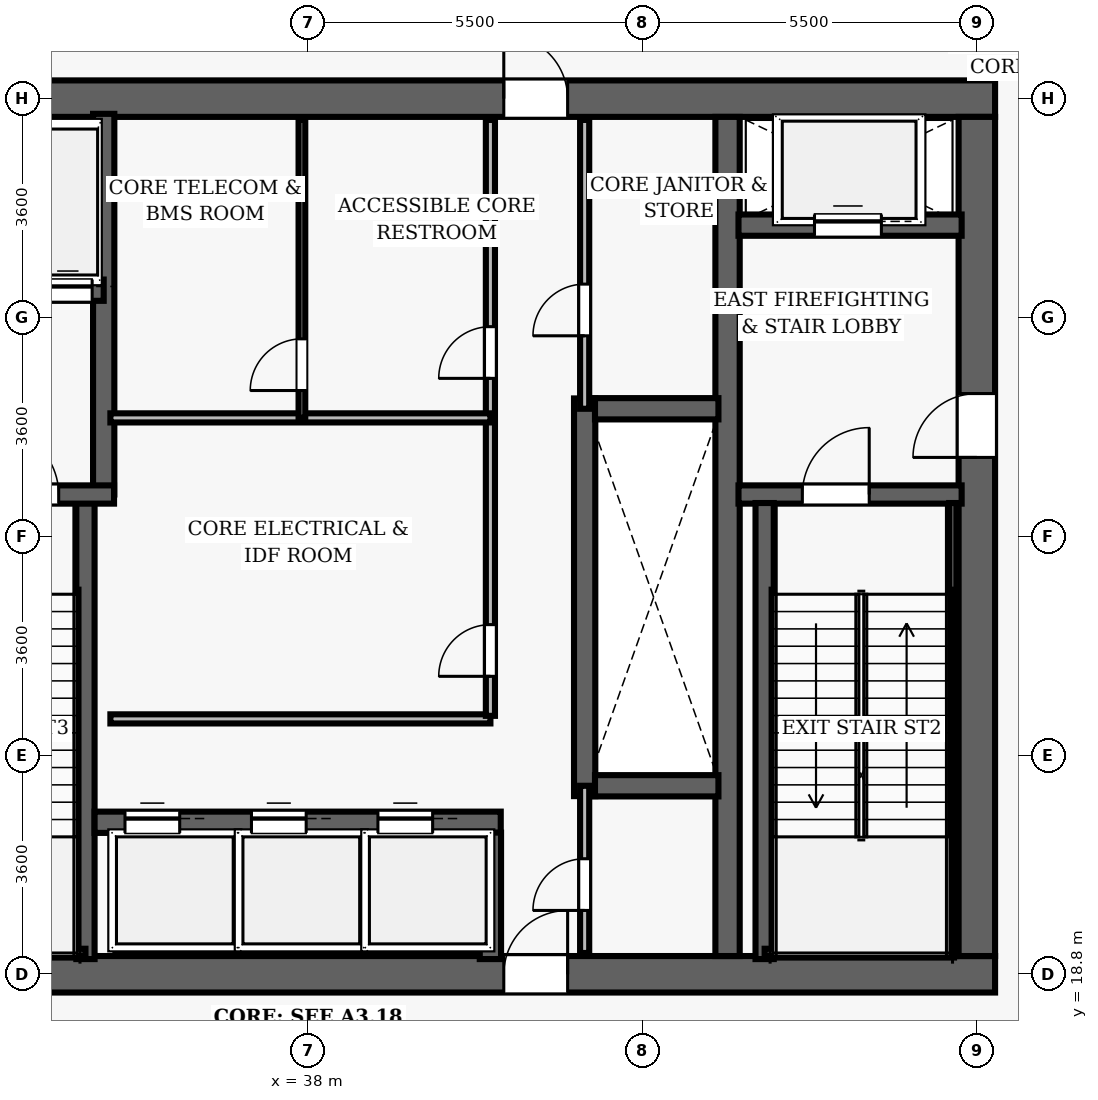
"""IFC4 building model, lengths in metres.
Left out: names, types, materials, properties, quantities, classifications, styles, units other than length and angle.
Written with IfcOpenShell. Run it as: python <this file> out.ifc"""

import sys

from ifc_helpers import new_model, si_unit, direction, frame, frame_2d, origin, place, context, subcontext, project, spatial, rectangle, extrude, element, fill, save


model = new_model("IFC4")
c1 = context("Model", 3, precision=1e-05, world=origin(), true_north=direction((0.0, 1.0)))
c2 = subcontext(c1, "Body", "Model", "MODEL_VIEW")
j1 = project(units=[si_unit("LENGTHUNIT", "METRE"), si_unit("PLANEANGLEUNIT", "RADIAN")], contexts=[c1])
p1 = place(None, origin())
s1 = spatial("IfcSite", under=j1, at=p1, CompositionType="ELEMENT")
p2 = place(p1, origin())
s2 = spatial("IfcBuilding", under=s1, at=p2, CompositionType="ELEMENT")
p3 = place(p2, frame((0.0, 0.0, 165.8)))
s3 = spatial("IfcBuildingStorey", under=s2, at=p3, CompositionType="ELEMENT", Elevation=165.8)
p4 = place(p3, frame((26.7, 18.8, 0.0), z_axis=(0.0, 0.0, 1.0), x_axis=(1.0, 0.0, 0.0)))
e1 = element("IfcWall", 1, at=p4, inside=s3, PredefinedType="SHEAR", context=c2, shape_type="SweptSolid", body=[
    extrude(rectangle(XDim=22.6, YDim=0.6, at=frame_2d((11.3, 0.0))), origin(), (0.0, 0.0, 1.0), 5.4),
])
p5 = place(p4, frame((14.52, 0.0, 0.0)))
e2 = element("IfcOpeningElement", 2, at=p5, cuts=e1, PredefinedType="OPENING", context=c2, shape_type="SweptSolid", body=[
    extrude(rectangle(XDim=1.05, YDim=2.15, at=frame_2d((0.525, 1.075))), frame((0.0, 0.31, 0.0), z_axis=(0.0, -1.0, 0.0), x_axis=(1.0, 0.0, 0.0)), (0.0, 0.0, 1.0), 0.62),
])
p6 = place(p3, frame((26.7, 33.2, 0.0), z_axis=(0.0, 0.0, 1.0), x_axis=(1.0, 0.0, 0.0)))
e3 = element("IfcWall", 3, at=p6, inside=s3, PredefinedType="SHEAR", context=c2, shape_type="SweptSolid", body=[
    extrude(rectangle(XDim=22.6, YDim=0.6, at=frame_2d((11.3, 0.0))), origin(), (0.0, 0.0, 1.0), 5.4),
])
p7 = place(p6, frame((4.62, 0.0, 0.0)))
e4 = element("IfcOpeningElement", 4, at=p7, cuts=e3, PredefinedType="OPENING", context=c2, shape_type="SweptSolid", body=[
    extrude(rectangle(XDim=1.05, YDim=2.15, at=frame_2d((0.525, 1.075))), frame((0.0, 0.31, 0.0), z_axis=(0.0, -1.0, 0.0), x_axis=(1.0, 0.0, 0.0)), (0.0, 0.0, 1.0), 0.62),
])
p8 = place(p6, frame((14.52, 0.0, 0.0)))
e5 = element("IfcOpeningElement", 5, at=p8, cuts=e3, PredefinedType="OPENING", context=c2, shape_type="SweptSolid", body=[
    extrude(rectangle(XDim=1.05, YDim=2.15, at=frame_2d((0.525, 1.075))), frame((0.0, 0.31, 0.0), z_axis=(0.0, -1.0, 0.0), x_axis=(1.0, 0.0, 0.0)), (0.0, 0.0, 1.0), 0.62),
])
p9 = place(p3, frame((49.0, 19.1, 0.0), z_axis=(0.0, 0.0, 1.0), x_axis=(0.0, 1.0, 0.0)))
e6 = element("IfcWall", 6, at=p9, inside=s3, PredefinedType="SHEAR", context=c2, shape_type="SweptSolid", body=[
    extrude(rectangle(XDim=13.8, YDim=0.6, at=frame_2d((6.9, 0.0))), origin(), (0.0, 0.0, 1.0), 5.4),
])
p10 = place(p9, frame((8.2, 0.0, 0.0)))
e7 = element("IfcOpeningElement", 7, at=p10, cuts=e6, PredefinedType="OPENING", context=c2, shape_type="SweptSolid", body=[
    extrude(rectangle(XDim=1.05, YDim=2.15, at=frame_2d((0.525, 1.075))), frame((0.0, 0.31, 0.0), z_axis=(0.0, -1.0, 0.0), x_axis=(1.0, 0.0, 0.0)), (0.0, 0.0, 1.0), 0.62),
])
p11 = place(p3, frame((44.9, 19.1, 0.0), z_axis=(0.0, 0.0, 1.0), x_axis=(0.0, 1.0, 0.0)))
e8 = element("IfcWall", 8, at=p11, inside=s3, PredefinedType="SHEAR", context=c2, shape_type="SweptSolid", body=[
    extrude(rectangle(XDim=13.8, YDim=0.4, at=frame_2d((6.9, 0.0))), origin(), (0.0, 0.0, 1.0), 5.4),
])
p12 = place(p3, frame((45.08, 26.69, 0.0), z_axis=(0.0, 0.0, 1.0), x_axis=(1.0, 0.0, 0.0)))
e9 = element("IfcWall", 9, at=p12, inside=s3, PredefinedType="SHEAR", context=c2, shape_type="SweptSolid", body=[
    extrude(rectangle(XDim=3.67, YDim=0.3, at=frame_2d((1.835, 0.0))), origin(), (0.0, 0.0, 1.0), 5.4),
])
p13 = place(p12, frame((1.05, 0.0, 0.0)))
e10 = element("IfcOpeningElement", 10, at=p13, cuts=e9, PredefinedType="OPENING", context=c2, shape_type="SweptSolid", body=[
    extrude(rectangle(XDim=1.1, YDim=2.15, at=frame_2d((0.55, 1.075))), frame((0.0, 0.16, 0.0), z_axis=(0.0, -1.0, 0.0), x_axis=(1.0, 0.0, 0.0)), (0.0, 0.0, 1.0), 0.32),
])
p14 = place(p3, frame((45.51, 19.05, 0.0), z_axis=(0.0, 0.0, 1.0), x_axis=(0.0, 1.0, 0.0)))
e11 = element("IfcWall", 11, at=p14, inside=s3, PredefinedType="SHEAR", context=c2, shape_type="SweptSolid", body=[
    extrude(rectangle(XDim=7.5, YDim=0.3, at=frame_2d((3.75, 0.0))), origin(), (0.0, 0.0, 1.0), 5.4),
])
p15 = place(p3, frame((48.605, 19.1, 0.0), z_axis=(0.0, 0.0, 1.0), x_axis=(0.0, 1.0, 0.0)))
e12 = element("IfcWall", 12, at=p15, inside=s3, PredefinedType="SHEAR", context=c2, shape_type="SweptSolid", body=[
    extrude(rectangle(XDim=7.45, YDim=0.12, at=frame_2d((3.725, 0.0))), origin(), (0.0, 0.0, 1.0), 5.4),
])
p16 = place(p3, frame((45.51, 19.16, 0.0), z_axis=(0.0, 0.0, 1.0), x_axis=(1.0, 0.0, 0.0)))
e13 = element("IfcWall", 13, at=p16, inside=s3, PredefinedType="SHEAR", context=c2, shape_type="SweptSolid", body=[
    extrude(rectangle(XDim=3.095, YDim=0.12, at=frame_2d((1.547, 0.0))), origin(), (0.0, 0.0, 1.0), 5.4),
])
p17 = place(p3, frame((45.08, 31.12, 0.0), z_axis=(0.0, 0.0, 1.0), x_axis=(1.0, 0.0, 0.0)))
e14 = element("IfcWall", 14, at=p17, inside=s3, PredefinedType="SHEAR", context=c2, shape_type="SweptSolid", body=[
    extrude(rectangle(XDim=3.67, YDim=0.35, at=frame_2d((1.835, 0.0))), origin(), (0.0, 0.0, 1.0), 4.04),
])
p18 = place(p17, frame((1.25, 0.0, 0.0)))
e15 = element("IfcOpeningElement", 15, at=p18, cuts=e14, PredefinedType="OPENING", context=c2, shape_type="SweptSolid", body=[
    extrude(rectangle(XDim=1.1, YDim=2.15, at=frame_2d((0.55, 1.075))), frame((0.0, 0.185, 0.0), z_axis=(0.0, -1.0, 0.0), x_axis=(1.0, 0.0, 0.0)), (0.0, 0.0, 1.0), 0.37),
])
p19 = place(p3, frame((34.34, 19.05, 0.0), z_axis=(0.0, 0.0, 1.0), x_axis=(0.0, 1.0, 0.0)))
e16 = element("IfcWall", 16, at=p19, inside=s3, PredefinedType="SHEAR", context=c2, shape_type="SweptSolid", body=[
    extrude(rectangle(XDim=7.5, YDim=0.3, at=frame_2d((3.75, 0.0))), origin(), (0.0, 0.0, 1.0), 5.4),
])
p20 = place(p3, frame((34.64, 26.69, 0.0), z_axis=(0.0, 0.0, 1.0), x_axis=(0.0, 1.0, 0.0)))
e17 = element("IfcWall", 17, at=p20, inside=s3, PredefinedType="SHEAR", context=c2, shape_type="SweptSolid", body=[
    extrude(rectangle(XDim=6.26, YDim=0.35, at=frame_2d((3.13, 0.0))), origin(), (0.0, 0.0, 1.0), 5.4),
])
p21 = place(p3, frame((31.25, 26.69, 0.0), z_axis=(0.0, 0.0, 1.0), x_axis=(1.0, 0.0, 0.0)))
e18 = element("IfcWall", 18, at=p21, inside=s3, PredefinedType="SHEAR", context=c2, shape_type="SweptSolid", body=[
    extrude(rectangle(XDim=3.56, YDim=0.3, at=frame_2d((1.78, 0.0))), origin(), (0.0, 0.0, 1.0), 5.4),
])
p22 = place(p21, frame((1.55, 0.0, 0.0)))
e19 = element("IfcOpeningElement", 19, at=p22, cuts=e18, PredefinedType="OPENING", context=c2, shape_type="SweptSolid", body=[
    extrude(rectangle(XDim=1.1, YDim=2.15, at=frame_2d((0.55, 1.075))), frame((0.0, 0.16, 0.0), z_axis=(0.0, -1.0, 0.0), x_axis=(1.0, 0.0, 0.0)), (0.0, 0.0, 1.0), 0.32),
])
p23 = place(p3, frame((31.3, 19.16, 0.0), z_axis=(0.0, 0.0, 1.0), x_axis=(1.0, 0.0, 0.0)))
e20 = element("IfcWall", 20, at=p23, inside=s3, PredefinedType="SHEAR", context=c2, shape_type="SweptSolid", body=[
    extrude(rectangle(XDim=3.04, YDim=0.12, at=frame_2d((1.52, 0.0))), origin(), (0.0, 0.0, 1.0), 5.4),
])
p24 = place(p3, frame((32.23, 30.05, 0.0), z_axis=(0.0, 0.0, 1.0), x_axis=(1.0, 0.0, 0.0)))
e21 = element("IfcWall", 21, at=p24, inside=s3, PredefinedType="SHEAR", context=c2, shape_type="SweptSolid", body=[
    extrude(rectangle(XDim=2.41, YDim=0.35, at=frame_2d((1.205, 0.0))), origin(), (0.0, 0.0, 1.0), 4.04),
])
p25 = place(p24, frame((0.42, 0.0, 0.0)))
e22 = element("IfcOpeningElement", 22, at=p25, cuts=e21, PredefinedType="OPENING", context=c2, shape_type="SweptSolid", body=[
    extrude(rectangle(XDim=0.8, YDim=2.15, at=frame_2d((0.4, 1.075))), frame((0.0, 0.185, 0.0), z_axis=(0.0, -1.0, 0.0), x_axis=(1.0, 0.0, 0.0)), (0.0, 0.0, 1.0), 0.37),
])
p26 = place(p24, frame((1.42, 0.0, 0.0)))
e23 = element("IfcOpeningElement", 23, at=p26, cuts=e21, PredefinedType="OPENING", context=c2, shape_type="SweptSolid", body=[
    extrude(rectangle(XDim=0.8, YDim=2.15, at=frame_2d((0.4, 1.075))), frame((0.0, 0.185, 0.0), z_axis=(0.0, -1.0, 0.0), x_axis=(1.0, 0.0, 0.0)), (0.0, 0.0, 1.0), 0.37),
])
p27 = place(p3, frame((42.55, 21.73, 0.0), z_axis=(0.0, 0.0, 1.0), x_axis=(0.0, 1.0, 0.0)))
e24 = element("IfcWall", 24, at=p27, inside=s3, PredefinedType="SHEAR", context=c2, shape_type="SweptSolid", body=[
    extrude(rectangle(XDim=6.54, YDim=0.35, at=frame_2d((3.27, 0.0))), origin(), (0.0, 0.0, 1.0), 4.04),
])
for number, where, z_axis, x_axis in (
    (25, (42.72, 21.9, 0.0), (0.0, 0.0, 1.0), (1.0, 0.0, 0.0)),
    (26, (42.72, 28.1, 0.0), (0.0, 0.0, 1.0), (1.0, 0.0, 0.0)),
):
    element("IfcWall", number, at=place(p3, frame(where, z_axis=z_axis, x_axis=x_axis)), inside=s3, PredefinedType="SHEAR", context=c2, shape_type="SweptSolid", body=[
        extrude(rectangle(XDim=2.03, YDim=0.35, at=frame_2d((1.015, 0.0))), origin(), (0.0, 0.0, 1.0), 4.04),
    ])
p28 = place(p3, frame((34.49, 21.3, 0.0), z_axis=(0.0, 0.0, 1.0), x_axis=(1.0, 0.0, 0.0)))
e27 = element("IfcWall", 27, at=p28, inside=s3, PredefinedType="SHEAR", context=c2, shape_type="SweptSolid", body=[
    extrude(rectangle(XDim=6.68, YDim=0.35, at=frame_2d((3.34, 0.0))), origin(), (0.0, 0.0, 1.0), 4.04),
])
p29 = place(p28, frame((0.5, 0.0, 0.0)))
e28 = element("IfcOpeningElement", 28, at=p29, cuts=e27, PredefinedType="OPENING", context=c2, shape_type="SweptSolid", body=[
    extrude(rectangle(XDim=0.9, YDim=2.15, at=frame_2d((0.45, 1.075))), frame((0.0, 0.185, 0.0), z_axis=(0.0, -1.0, 0.0), x_axis=(1.0, 0.0, 0.0)), (0.0, 0.0, 1.0), 0.37),
])
p30 = place(p28, frame((2.58, 0.0, 0.0)))
e29 = element("IfcOpeningElement", 29, at=p30, cuts=e27, PredefinedType="OPENING", context=c2, shape_type="SweptSolid", body=[
    extrude(rectangle(XDim=0.9, YDim=2.15, at=frame_2d((0.45, 1.075))), frame((0.0, 0.185, 0.0), z_axis=(0.0, -1.0, 0.0), x_axis=(1.0, 0.0, 0.0)), (0.0, 0.0, 1.0), 0.37),
])
p31 = place(p28, frame((4.66, 0.0, 0.0)))
e30 = element("IfcOpeningElement", 30, at=p31, cuts=e27, PredefinedType="OPENING", context=c2, shape_type="SweptSolid", body=[
    extrude(rectangle(XDim=0.9, YDim=2.15, at=frame_2d((0.45, 1.075))), frame((0.0, 0.185, 0.0), z_axis=(0.0, -1.0, 0.0), x_axis=(1.0, 0.0, 0.0)), (0.0, 0.0, 1.0), 0.37),
])
p32 = place(p3, frame((41.0, 19.05, 0.0), z_axis=(0.0, 0.0, 1.0), x_axis=(0.0, 1.0, 0.0)))
e31 = element("IfcWall", 31, at=p32, inside=s3, PredefinedType="SHEAR", context=c2, shape_type="SweptSolid", body=[
    extrude(rectangle(XDim=2.08, YDim=0.35, at=frame_2d((1.04, 0.0))), origin(), (0.0, 0.0, 1.0), 4.04),
])
p33 = place(p3, frame((34.75, 23.0, 0.0), z_axis=(0.0, 0.0, 1.0), x_axis=(1.0, 0.0, 0.0)))
e32 = element("IfcWall", 32, at=p33, inside=s3, PredefinedType="PARTITIONING", context=c2, shape_type="SweptSolid", body=[
    extrude(rectangle(XDim=6.25, YDim=0.15, at=frame_2d((3.125, 0.0))), origin(), (0.0, 0.0, 1.0), 4.04),
])
p34 = place(p3, frame((41.0, 23.05, 0.0), z_axis=(0.0, 0.0, 1.0), x_axis=(0.0, 1.0, 0.0)))
e33 = element("IfcWall", 33, at=p34, inside=s3, PredefinedType="PARTITIONING", context=c2, shape_type="SweptSolid", body=[
    extrude(rectangle(XDim=9.8, YDim=0.15, at=frame_2d((4.9, 0.0))), origin(), (0.0, 0.0, 1.0), 4.04),
])
p35 = place(p34, frame((0.65, 0.0, 0.0)))
e34 = element("IfcOpeningElement", 34, at=p35, cuts=e33, PredefinedType="OPENING", context=c2, shape_type="SweptSolid", body=[
    extrude(rectangle(XDim=0.85, YDim=2.1, at=frame_2d((0.425, 1.05))), frame((0.0, 0.085, 0.0), z_axis=(0.0, -1.0, 0.0), x_axis=(1.0, 0.0, 0.0)), (0.0, 0.0, 1.0), 0.17),
])
p36 = place(p34, frame((5.55, 0.0, 0.0)))
e35 = element("IfcOpeningElement", 35, at=p36, cuts=e33, PredefinedType="OPENING", context=c2, shape_type="SweptSolid", body=[
    extrude(rectangle(XDim=0.85, YDim=2.1, at=frame_2d((0.425, 1.05))), frame((0.0, 0.085, 0.0), z_axis=(0.0, -1.0, 0.0), x_axis=(1.0, 0.0, 0.0)), (0.0, 0.0, 1.0), 0.17),
])
p37 = place(p3, frame((34.75, 27.95, 0.0), z_axis=(0.0, 0.0, 1.0), x_axis=(1.0, 0.0, 0.0)))
e36 = element("IfcWall", 36, at=p37, inside=s3, PredefinedType="PARTITIONING", context=c2, shape_type="SweptSolid", body=[
    extrude(rectangle(XDim=6.25, YDim=0.15, at=frame_2d((3.125, 0.0))), origin(), (0.0, 0.0, 1.0), 4.04),
])
p38 = place(p3, frame((37.9, 27.95, 0.0), z_axis=(0.0, 0.0, 1.0), x_axis=(0.0, 1.0, 0.0)))
e37 = element("IfcWall", 37, at=p38, inside=s3, PredefinedType="PARTITIONING", context=c2, shape_type="SweptSolid", body=[
    extrude(rectangle(XDim=4.9, YDim=0.11, at=frame_2d((2.45, 0.0))), origin(), (0.0, 0.0, 1.0), 4.04),
])
p39 = place(p38, frame((0.45, 0.0, 0.0)))
e38 = element("IfcOpeningElement", 38, at=p39, cuts=e37, PredefinedType="OPENING", context=c2, shape_type="SweptSolid", body=[
    extrude(rectangle(XDim=0.85, YDim=2.1, at=frame_2d((0.425, 1.05))), frame((0.0, 0.065, 0.0), z_axis=(0.0, -1.0, 0.0), x_axis=(1.0, 0.0, 0.0)), (0.0, 0.0, 1.0), 0.13),
])
p40 = place(p3, frame((42.55, 28.1, 0.0), z_axis=(0.0, 0.0, 1.0), x_axis=(0.0, 1.0, 0.0)))
e39 = element("IfcWall", 39, at=p40, inside=s3, PredefinedType="PARTITIONING", context=c2, shape_type="SweptSolid", body=[
    extrude(rectangle(XDim=4.75, YDim=0.15, at=frame_2d((2.375, 0.0))), origin(), (0.0, 0.0, 1.0), 4.04),
])
p41 = place(p40, frame((1.2, 0.0, 0.0)))
e40 = element("IfcOpeningElement", 40, at=p41, cuts=e39, PredefinedType="OPENING", context=c2, shape_type="SweptSolid", body=[
    extrude(rectangle(XDim=0.85, YDim=2.1, at=frame_2d((0.425, 1.05))), frame((0.0, 0.085, 0.0), z_axis=(0.0, -1.0, 0.0), x_axis=(1.0, 0.0, 0.0)), (0.0, 0.0, 1.0), 0.17),
])
p42 = place(p3, frame((42.55, 19.15, 0.0), z_axis=(0.0, 0.0, 1.0), x_axis=(0.0, 1.0, 0.0)))
e41 = element("IfcWall", 41, at=p42, inside=s3, PredefinedType="PARTITIONING", context=c2, shape_type="SweptSolid", body=[
    extrude(rectangle(XDim=2.75, YDim=0.15, at=frame_2d((1.375, 0.0))), origin(), (0.0, 0.0, 1.0), 4.04),
])
p43 = place(p42, frame((0.7, 0.0, 0.0)))
e42 = element("IfcOpeningElement", 42, at=p43, cuts=e41, PredefinedType="OPENING", context=c2, shape_type="SweptSolid", body=[
    extrude(rectangle(XDim=0.85, YDim=2.1, at=frame_2d((0.425, 1.05))), frame((0.0, 0.085, 0.0), z_axis=(0.0, -1.0, 0.0), x_axis=(1.0, 0.0, 0.0)), (0.0, 0.0, 1.0), 0.17),
])
p44 = place(p13, origin())
e43 = element("IfcDoor", 43, at=p44, inside=s3, OperationType="SINGLE_SWING_RIGHT", PredefinedType="DOOR", context=c2, shape_type="SweptSolid", body=[
    extrude(rectangle(XDim=1.1, YDim=2.15, at=frame_2d((0.55, 1.075))), frame((0.0, 0.025, 0.0), z_axis=(0.0, -1.0, 0.0), x_axis=(1.0, 0.0, 0.0)), (0.0, 0.0, 1.0), 0.05),
])
fill(e10, e43)
p45 = place(p10, origin())
e44 = element("IfcDoor", 44, at=p45, inside=s3, OperationType="SINGLE_SWING_LEFT", PredefinedType="DOOR", context=c2, shape_type="SweptSolid", body=[
    extrude(rectangle(XDim=1.05, YDim=2.15, at=frame_2d((0.525, 1.075))), frame((0.0, 0.025, 0.0), z_axis=(0.0, -1.0, 0.0), x_axis=(1.0, 0.0, 0.0)), (0.0, 0.0, 1.0), 0.05),
])
fill(e7, e44)
p46 = place(p22, origin())
e45 = element("IfcDoor", 45, at=p46, inside=s3, OperationType="SINGLE_SWING_LEFT", PredefinedType="DOOR", context=c2, shape_type="SweptSolid", body=[
    extrude(rectangle(XDim=1.1, YDim=2.15, at=frame_2d((0.55, 1.075))), frame((0.0, 0.025, 0.0), z_axis=(0.0, -1.0, 0.0), x_axis=(1.0, 0.0, 0.0)), (0.0, 0.0, 1.0), 0.05),
])
fill(e19, e45)
p47 = place(p8, origin())
e46 = element("IfcDoor", 46, at=p47, inside=s3, OperationType="SINGLE_SWING_LEFT", PredefinedType="DOOR", context=c2, shape_type="SweptSolid", body=[
    extrude(rectangle(XDim=1.05, YDim=2.15, at=frame_2d((0.525, 1.075))), frame((0.0, 0.025, 0.0), z_axis=(0.0, -1.0, 0.0), x_axis=(1.0, 0.0, 0.0)), (0.0, 0.0, 1.0), 0.05),
])
fill(e5, e46)
p48 = place(p5, origin())
e47 = element("IfcDoor", 47, at=p48, inside=s3, OperationType="SINGLE_SWING_RIGHT", PredefinedType="DOOR", context=c2, shape_type="SweptSolid", body=[
    extrude(rectangle(XDim=1.05, YDim=2.15, at=frame_2d((0.525, 1.075))), frame((0.0, 0.025, 0.0), z_axis=(0.0, -1.0, 0.0), x_axis=(1.0, 0.0, 0.0)), (0.0, 0.0, 1.0), 0.05),
])
fill(e2, e47)
p49 = place(p35, origin())
e48 = element("IfcDoor", 48, at=p49, inside=s3, OperationType="SINGLE_SWING_LEFT", PredefinedType="DOOR", context=c2, shape_type="SweptSolid", body=[
    extrude(rectangle(XDim=0.85, YDim=2.1, at=frame_2d((0.425, 1.05))), frame((0.0, 0.025, 0.0), z_axis=(0.0, -1.0, 0.0), x_axis=(1.0, 0.0, 0.0)), (0.0, 0.0, 1.0), 0.05),
])
fill(e34, e48)
p50 = place(p36, origin())
e49 = element("IfcDoor", 49, at=p50, inside=s3, OperationType="SINGLE_SWING_LEFT", PredefinedType="DOOR", context=c2, shape_type="SweptSolid", body=[
    extrude(rectangle(XDim=0.85, YDim=2.1, at=frame_2d((0.425, 1.05))), frame((0.0, 0.025, 0.0), z_axis=(0.0, -1.0, 0.0), x_axis=(1.0, 0.0, 0.0)), (0.0, 0.0, 1.0), 0.05),
])
fill(e35, e49)
p51 = place(p39, origin())
e50 = element("IfcDoor", 50, at=p51, inside=s3, OperationType="SINGLE_SWING_LEFT", PredefinedType="DOOR", context=c2, shape_type="SweptSolid", body=[
    extrude(rectangle(XDim=0.85, YDim=2.1, at=frame_2d((0.425, 1.05))), frame((0.0, 0.025, 0.0), z_axis=(0.0, -1.0, 0.0), x_axis=(1.0, 0.0, 0.0)), (0.0, 0.0, 1.0), 0.05),
])
fill(e38, e50)
p52 = place(p41, origin())
e51 = element("IfcDoor", 51, at=p52, inside=s3, OperationType="SINGLE_SWING_LEFT", PredefinedType="DOOR", context=c2, shape_type="SweptSolid", body=[
    extrude(rectangle(XDim=0.85, YDim=2.1, at=frame_2d((0.425, 1.05))), frame((0.0, 0.025, 0.0), z_axis=(0.0, -1.0, 0.0), x_axis=(1.0, 0.0, 0.0)), (0.0, 0.0, 1.0), 0.05),
])
fill(e40, e51)
p53 = place(p43, origin())
e52 = element("IfcDoor", 52, at=p53, inside=s3, OperationType="SINGLE_SWING_LEFT", PredefinedType="DOOR", context=c2, shape_type="SweptSolid", body=[
    extrude(rectangle(XDim=0.85, YDim=2.1, at=frame_2d((0.425, 1.05))), frame((0.0, 0.025, 0.0), z_axis=(0.0, -1.0, 0.0), x_axis=(1.0, 0.0, 0.0)), (0.0, 0.0, 1.0), 0.05),
])
fill(e42, e52)
p54 = place(p29, origin())
e53 = element("IfcDoor", 53, at=p54, inside=s3, OperationType="SLIDING_TO_LEFT", PredefinedType="DOOR", context=c2, shape_type="SweptSolid", body=[
    extrude(rectangle(XDim=0.9, YDim=2.15, at=frame_2d((0.45, 1.075))), frame((0.0, 0.025, 0.0), z_axis=(0.0, -1.0, 0.0), x_axis=(1.0, 0.0, 0.0)), (0.0, 0.0, 1.0), 0.05),
])
fill(e28, e53)
p55 = place(p30, origin())
e54 = element("IfcDoor", 54, at=p55, inside=s3, OperationType="SLIDING_TO_LEFT", PredefinedType="DOOR", context=c2, shape_type="SweptSolid", body=[
    extrude(rectangle(XDim=0.9, YDim=2.15, at=frame_2d((0.45, 1.075))), frame((0.0, 0.025, 0.0), z_axis=(0.0, -1.0, 0.0), x_axis=(1.0, 0.0, 0.0)), (0.0, 0.0, 1.0), 0.05),
])
fill(e29, e54)
p56 = place(p31, origin())
e55 = element("IfcDoor", 55, at=p56, inside=s3, OperationType="SLIDING_TO_LEFT", PredefinedType="DOOR", context=c2, shape_type="SweptSolid", body=[
    extrude(rectangle(XDim=0.9, YDim=2.15, at=frame_2d((0.45, 1.075))), frame((0.0, 0.025, 0.0), z_axis=(0.0, -1.0, 0.0), x_axis=(1.0, 0.0, 0.0)), (0.0, 0.0, 1.0), 0.05),
])
fill(e30, e55)
p57 = place(p18, origin())
e56 = element("IfcDoor", 56, at=p57, inside=s3, OperationType="SLIDING_TO_LEFT", PredefinedType="DOOR", context=c2, shape_type="SweptSolid", body=[
    extrude(rectangle(XDim=1.1, YDim=2.15, at=frame_2d((0.55, 1.075))), frame((0.0, 0.025, 0.0), z_axis=(0.0, -1.0, 0.0), x_axis=(1.0, 0.0, 0.0)), (0.0, 0.0, 1.0), 0.05),
])
fill(e15, e56)
p58 = place(p26, origin())
e57 = element("IfcDoor", 57, at=p58, inside=s3, OperationType="SLIDING_TO_LEFT", PredefinedType="DOOR", context=c2, shape_type="SweptSolid", body=[
    extrude(rectangle(XDim=0.8, YDim=2.15, at=frame_2d((0.4, 1.075))), frame((0.0, 0.025, 0.0), z_axis=(0.0, -1.0, 0.0), x_axis=(1.0, 0.0, 0.0)), (0.0, 0.0, 1.0), 0.05),
])
fill(e23, e57)
save(model, sys.argv[1])
